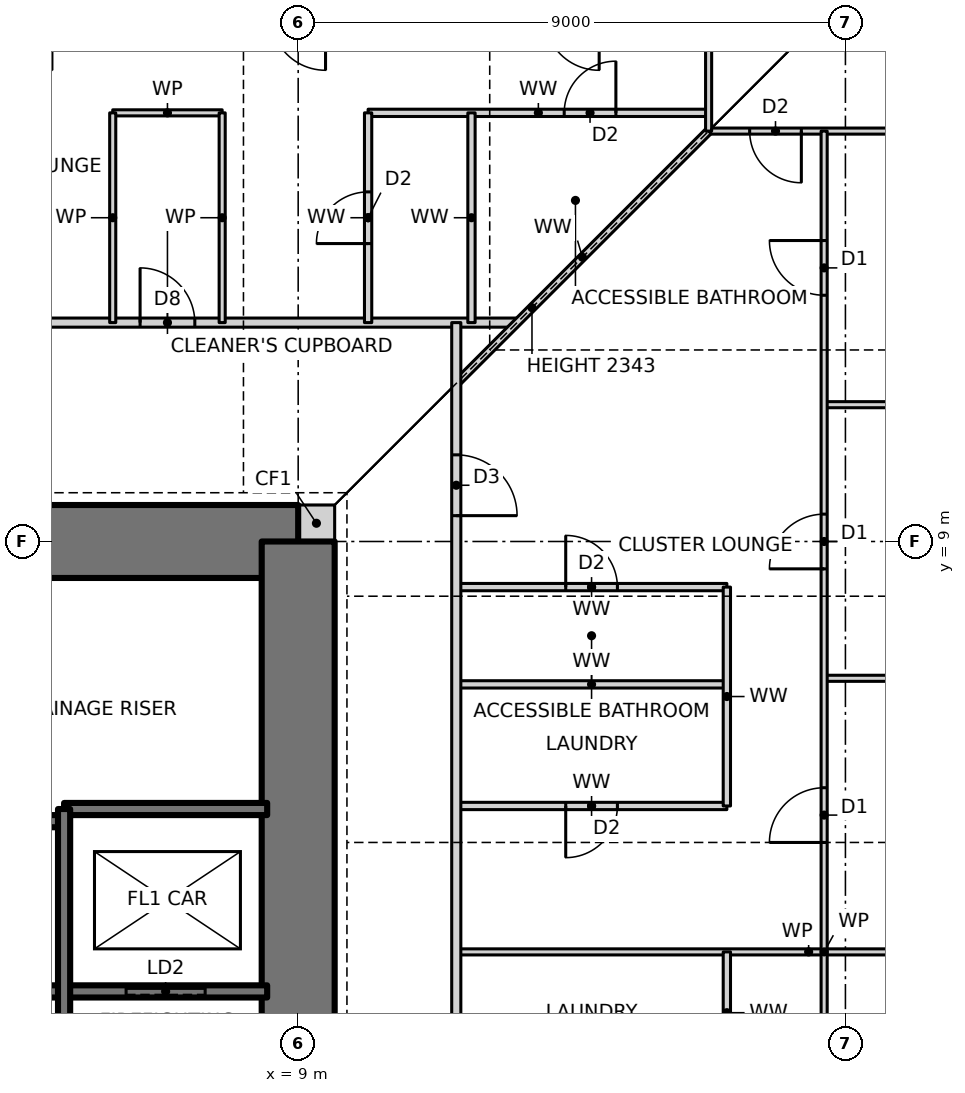
"""IFC4 building model, lengths in metres.
Left out: names, types, materials, properties, quantities, classifications, styles, units other than length and angle.
Written with IfcOpenShell. Run it as: python <this file> out.ifc"""

import sys

from ifc_helpers import new_model, si_unit, direction, frame, frame_2d, origin, place, context, subcontext, project, spatial, rectangle, extrude, element, fill, save


model = new_model("IFC4")
c1 = context("Model", 3, precision=1e-05, world=origin(), true_north=direction((0.0, 1.0)))
c2 = subcontext(c1, "Body", "Model", "MODEL_VIEW")
j1 = project(units=[si_unit("LENGTHUNIT", "METRE"), si_unit("PLANEANGLEUNIT", "RADIAN")], contexts=[c1])
p1 = place(None, origin())
s1 = spatial("IfcSite", under=j1, at=p1, CompositionType="ELEMENT")
p2 = place(p1, origin())
s2 = spatial("IfcBuilding", under=s1, at=p2, CompositionType="ELEMENT")
p3 = place(p2, frame((0.0, 0.0, 39.5)))
s3 = spatial("IfcBuildingStorey", under=s2, at=p3, CompositionType="ELEMENT", Elevation=39.5)
p4 = place(p3, frame((9.0, 9.3, 0.0), z_axis=(0.0, 0.0, 1.0), x_axis=(1.0, 0.0, 0.0)))
e1 = element("IfcWall", 1, at=p4, inside=s3, PredefinedType="SOLIDWALL", context=c2, shape_type="SweptSolid", body=[
    extrude(rectangle(XDim=0.6, YDim=0.6, at=frame_2d((0.3, 0.0))), origin(), (0.0, 0.0, 1.0), 3.5),
])
p5 = place(p3, frame((9.0, 9.0, 0.0), z_axis=(0.0, 0.0, 1.0), x_axis=(-1.0, 0.0, 0.0)))
e2 = element("IfcWall", 2, at=p5, inside=s3, PredefinedType="SHEAR", context=c2, shape_type="SweptSolid", body=[
    extrude(rectangle(XDim=18.0, YDim=1.2, at=frame_2d((9.0, 0.0))), origin(), (0.0, 0.0, 1.0), 3.5),
])
p6 = place(p5, frame((11.125, 0.0, 0.0)))
e3 = element("IfcOpeningElement", 3, at=p6, cuts=e2, PredefinedType="OPENING", context=c2, shape_type="SweptSolid", body=[
    extrude(rectangle(XDim=0.9, YDim=2.1, at=frame_2d((0.45, 1.05))), frame((0.0, 0.61, 0.0), z_axis=(0.0, -1.0, 0.0), x_axis=(1.0, 0.0, 0.0)), (0.0, 0.0, 1.0), 1.22),
])
p7 = place(p5, frame((4.275, 0.0, 0.0)))
e4 = element("IfcOpeningElement", 4, at=p7, cuts=e2, PredefinedType="OPENING", context=c2, shape_type="SweptSolid", body=[
    extrude(rectangle(XDim=0.9, YDim=2.1, at=frame_2d((0.45, 1.05))), frame((0.0, 0.61, 0.0), z_axis=(0.0, -1.0, 0.0), x_axis=(1.0, 0.0, 0.0)), (0.0, 0.0, 1.0), 1.22),
])
p8 = place(p3, frame((9.0, -9.0, 0.0), z_axis=(0.0, 0.0, 1.0), x_axis=(0.0, 1.0, 0.0)))
e5 = element("IfcWall", 5, at=p8, inside=s3, PredefinedType="SHEAR", context=c2, shape_type="SweptSolid", body=[
    extrude(rectangle(XDim=18.0, YDim=1.2, at=frame_2d((9.0, 0.0))), origin(), (0.0, 0.0, 1.0), 3.5),
])
p9 = place(p8, frame((8.5, 0.0, 0.0)))
e6 = element("IfcOpeningElement", 6, at=p9, cuts=e5, PredefinedType="OPENING", context=c2, shape_type="SweptSolid", body=[
    extrude(rectangle(XDim=1.0, YDim=2.1, at=frame_2d((0.5, 1.05))), frame((0.0, 0.61, 0.0), z_axis=(0.0, -1.0, 0.0), x_axis=(1.0, 0.0, 0.0)), (0.0, 0.0, 1.0), 1.22),
])
p10 = place(p3, frame((-8.49, 1.6, 0.0), z_axis=(0.0, 0.0, 1.0), x_axis=(1.0, 0.0, 0.0)))
e7 = element("IfcWall", 7, at=p10, inside=s3, PredefinedType="SOLIDWALL", context=c2, shape_type="SweptSolid", body=[
    extrude(rectangle(XDim=16.98, YDim=0.2, at=frame_2d((8.49, 0.0))), origin(), (0.0, 0.0, 1.0), 3.5),
])
p11 = place(p10, frame((1.17, 0.0, 0.0)))
e8 = element("IfcOpeningElement", 8, at=p11, cuts=e7, PredefinedType="OPENING", context=c2, shape_type="SweptSolid", body=[
    extrude(rectangle(XDim=1.0, YDim=2.1, at=frame_2d((0.5, 1.05))), frame((0.0, 0.11, 0.0), z_axis=(0.0, -1.0, 0.0), x_axis=(1.0, 0.0, 0.0)), (0.0, 0.0, 1.0), 0.22),
])
p12 = place(p10, frame((14.66, 0.0, 0.0)))
e9 = element("IfcOpeningElement", 9, at=p12, cuts=e7, PredefinedType="OPENING", context=c2, shape_type="SweptSolid", body=[
    extrude(rectangle(XDim=1.3, YDim=2.1, at=frame_2d((0.65, 1.05))), frame((0.0, 0.11, 0.0), z_axis=(0.0, -1.0, 0.0), x_axis=(1.0, 0.0, 0.0)), (0.0, 0.0, 1.0), 0.22),
])
p13 = place(p3, frame((11.6, 2.25, 0.0), z_axis=(0.0, 0.0, 1.0), x_axis=(1.0, 0.0, 0.0)))
e10 = element("IfcWall", 10, at=p13, inside=s3, PredefinedType="PARTITIONING", context=c2, shape_type="SweptSolid", body=[
    extrude(rectangle(XDim=11.59, YDim=0.1, at=frame_2d((5.795, 0.0))), origin(), (0.0, 0.0, 1.0), 3.27),
])
p14 = place(p3, frame((-5.15, 4.4, 0.0), z_axis=(0.0, 0.0, 1.0), x_axis=(1.0, 0.0, 0.0)))
e11 = element("IfcWall", 11, at=p14, inside=s3, PredefinedType="SOLIDWALL", context=c2, shape_type="SweptSolid", body=[
    extrude(rectangle(XDim=10.3, YDim=0.2, at=frame_2d((5.15, 0.0))), origin(), (0.0, 0.0, 1.0), 3.5),
])
p15 = place(p3, frame((5.15, 4.6, 0.0), z_axis=(0.0, 0.0, 1.0), x_axis=(1.0, 0.0, 0.0)))
e12 = element("IfcWall", 12, at=p15, inside=s3, PredefinedType="SOLIDWALL", context=c2, shape_type="SweptSolid", body=[
    extrude(rectangle(XDim=3.34, YDim=0.2, at=frame_2d((1.67, 0.0))), origin(), (0.0, 0.0, 1.0), 3.5),
])
p16 = place(p3, frame((11.6, 4.65, 0.0), z_axis=(0.0, 0.0, 1.0), x_axis=(1.0, 0.0, 0.0)))
e13 = element("IfcWall", 13, at=p16, inside=s3, PredefinedType="PARTITIONING", context=c2, shape_type="SweptSolid", body=[
    extrude(rectangle(XDim=4.45, YDim=0.12, at=frame_2d((2.225, 0.0))), origin(), (0.0, 0.0, 1.0), 3.27),
])
p17 = place(p16, frame((1.8, 0.0, 0.0)))
e14 = element("IfcOpeningElement", 14, at=p17, cuts=e13, PredefinedType="OPENING", context=c2, shape_type="SweptSolid", body=[
    extrude(rectangle(XDim=0.85, YDim=2.1, at=frame_2d((0.425, 1.05))), frame((0.0, 0.07, 0.0), z_axis=(0.0, -1.0, 0.0), x_axis=(1.0, 0.0, 0.0)), (0.0, 0.0, 1.0), 0.14),
])
p18 = place(p3, frame((11.6, 6.65, 0.0), z_axis=(0.0, 0.0, 1.0), x_axis=(1.0, 0.0, 0.0)))
e15 = element("IfcWall", 15, at=p18, inside=s3, PredefinedType="PARTITIONING", context=c2, shape_type="SweptSolid", body=[
    extrude(rectangle(XDim=4.45, YDim=0.12, at=frame_2d((2.225, 0.0))), origin(), (0.0, 0.0, 1.0), 3.27),
])
p19 = place(p3, frame((17.65, 6.75, 0.0), z_axis=(0.0, 0.0, 1.0), x_axis=(1.0, 0.0, 0.0)))
e16 = element("IfcWall", 16, at=p19, inside=s3, PredefinedType="PARTITIONING", context=c2, shape_type="SweptSolid", body=[
    extrude(rectangle(XDim=5.54, YDim=0.1, at=frame_2d((2.77, 0.0))), origin(), (0.0, 0.0, 1.0), 3.27),
])
p20 = place(p3, frame((11.6, 8.25, 0.0), z_axis=(0.0, 0.0, 1.0), x_axis=(1.0, 0.0, 0.0)))
e17 = element("IfcWall", 17, at=p20, inside=s3, PredefinedType="PARTITIONING", context=c2, shape_type="SweptSolid", body=[
    extrude(rectangle(XDim=4.45, YDim=0.12, at=frame_2d((2.225, 0.0))), origin(), (0.0, 0.0, 1.0), 3.27),
])
p21 = place(p20, frame((1.8, 0.0, 0.0)))
e18 = element("IfcOpeningElement", 18, at=p21, cuts=e17, PredefinedType="OPENING", context=c2, shape_type="SweptSolid", body=[
    extrude(rectangle(XDim=0.85, YDim=2.1, at=frame_2d((0.425, 1.05))), frame((0.0, 0.07, 0.0), z_axis=(0.0, -1.0, 0.0), x_axis=(1.0, 0.0, 0.0)), (0.0, 0.0, 1.0), 0.14),
])
p22 = place(p3, frame((17.65, 11.25, 0.0), z_axis=(0.0, 0.0, 1.0), x_axis=(1.0, 0.0, 0.0)))
e19 = element("IfcWall", 19, at=p22, inside=s3, PredefinedType="PARTITIONING", context=c2, shape_type="SweptSolid", body=[
    extrude(rectangle(XDim=5.54, YDim=0.1, at=frame_2d((2.77, 0.0))), origin(), (0.0, 0.0, 1.0), 3.27),
])
p23 = place(p3, frame((-12.6, 12.6, 0.0), z_axis=(0.0, 0.0, 1.0), x_axis=(1.0, 0.0, 0.0)))
e20 = element("IfcWall", 20, at=p23, inside=s3, PredefinedType="PARTITIONING", context=c2, shape_type="SweptSolid", body=[
    extrude(rectangle(XDim=25.2, YDim=0.15, at=frame_2d((12.6, 0.0))), origin(), (0.0, 0.0, 1.0), 3.27),
])
p24 = place(p23, frame((16.15, 0.0, 0.0)))
e21 = element("IfcOpeningElement", 21, at=p24, cuts=e20, PredefinedType="OPENING", context=c2, shape_type="SweptSolid", body=[
    extrude(rectangle(XDim=1.0, YDim=2.1, at=frame_2d((0.5, 1.05))), frame((0.0, 0.085, 0.0), z_axis=(0.0, -1.0, 0.0), x_axis=(1.0, 0.0, 0.0)), (0.0, 0.0, 1.0), 0.17),
])
p25 = place(p23, frame((19.0, 0.0, 0.0)))
e22 = element("IfcOpeningElement", 22, at=p25, cuts=e20, PredefinedType="OPENING", context=c2, shape_type="SweptSolid", body=[
    extrude(rectangle(XDim=0.9, YDim=2.1, at=frame_2d((0.45, 1.05))), frame((0.0, 0.085, 0.0), z_axis=(0.0, -1.0, 0.0), x_axis=(1.0, 0.0, 0.0)), (0.0, 0.0, 1.0), 0.17),
])
p26 = place(p3, frame((15.75, 15.75, 0.0), z_axis=(0.0, 0.0, 1.0), x_axis=(1.0, 0.0, 0.0)))
e23 = element("IfcWall", 23, at=p26, inside=s3, PredefinedType="PARTITIONING", context=c2, shape_type="SweptSolid", body=[
    extrude(rectangle(XDim=7.44, YDim=0.1, at=frame_2d((3.72, 0.0))), origin(), (0.0, 0.0, 1.0), 3.27),
])
p27 = place(p26, frame((0.675, 0.0, 0.0)))
e24 = element("IfcOpeningElement", 24, at=p27, cuts=e23, PredefinedType="OPENING", context=c2, shape_type="SweptSolid", body=[
    extrude(rectangle(XDim=0.85, YDim=2.1, at=frame_2d((0.425, 1.05))), frame((0.0, 0.06, 0.0), z_axis=(0.0, -1.0, 0.0), x_axis=(1.0, 0.0, 0.0)), (0.0, 0.0, 1.0), 0.12),
])
p28 = place(p3, frame((5.95, 16.05, 0.0), z_axis=(0.0, 0.0, 1.0), x_axis=(1.0, 0.0, 0.0)))
e25 = element("IfcWall", 25, at=p28, inside=s3, PredefinedType="PARTITIONING", context=c2, shape_type="SweptSolid", body=[
    extrude(rectangle(XDim=1.8, YDim=0.1, at=frame_2d((0.9, 0.0))), origin(), (0.0, 0.0, 1.0), 3.27),
])
p29 = place(p3, frame((10.15, 16.05, 0.0), z_axis=(0.0, 0.0, 1.0), x_axis=(1.0, 0.0, 0.0)))
e26 = element("IfcWall", 26, at=p29, inside=s3, PredefinedType="PARTITIONING", context=c2, shape_type="SweptSolid", body=[
    extrude(rectangle(XDim=5.6, YDim=0.12, at=frame_2d((2.8, 0.0))), origin(), (0.0, 0.0, 1.0), 3.27),
])
p30 = place(p29, frame((3.225, 0.0, 0.0)))
e27 = element("IfcOpeningElement", 27, at=p30, cuts=e26, PredefinedType="OPENING", context=c2, shape_type="SweptSolid", body=[
    extrude(rectangle(XDim=0.85, YDim=2.1, at=frame_2d((0.425, 1.05))), frame((0.0, 0.07, 0.0), z_axis=(0.0, -1.0, 0.0), x_axis=(1.0, 0.0, 0.0)), (0.0, 0.0, 1.0), 0.14),
])
p31 = place(p3, frame((11.6, 11.6, 0.0), z_axis=(0.0, 0.0, 1.0), x_axis=(0.707106781187, 0.707106781187, 0.0)))
e28 = element("IfcWall", 28, at=p31, inside=s3, PredefinedType="PARTITIONING", context=c2, shape_type="SweptSolid", body=[
    extrude(rectangle(XDim=5.869, YDim=0.12, at=frame_2d((2.935, 0.0))), origin(), (0.0, 0.0, 1.0), 2.343),
])
p32 = place(p3, frame((17.65, -11.25, 0.0), z_axis=(0.0, 0.0, 1.0), x_axis=(0.0, 1.0, 0.0)))
e29 = element("IfcWall", 29, at=p32, inside=s3, PredefinedType="PARTITIONING", context=c2, shape_type="SweptSolid", body=[
    extrude(rectangle(XDim=27.0, YDim=0.1, at=frame_2d((13.5, 0.0))), origin(), (0.0, 0.0, 1.0), 3.0),
])
p33 = place(p32, frame((1.8, 0.0, 0.0)))
e30 = element("IfcOpeningElement", 30, at=p33, cuts=e29, PredefinedType="OPENING", context=c2, shape_type="SweptSolid", body=[
    extrude(rectangle(XDim=0.9, YDim=2.1, at=frame_2d((0.45, 1.05))), frame((0.0, 0.06, 0.0), z_axis=(0.0, -1.0, 0.0), x_axis=(1.0, 0.0, 0.0)), (0.0, 0.0, 1.0), 0.12),
])
p34 = place(p32, frame((6.3, 0.0, 0.0)))
e31 = element("IfcOpeningElement", 31, at=p34, cuts=e29, PredefinedType="OPENING", context=c2, shape_type="SweptSolid", body=[
    extrude(rectangle(XDim=0.9, YDim=2.1, at=frame_2d((0.45, 1.05))), frame((0.0, 0.06, 0.0), z_axis=(0.0, -1.0, 0.0), x_axis=(1.0, 0.0, 0.0)), (0.0, 0.0, 1.0), 0.12),
])
p35 = place(p32, frame((10.8, 0.0, 0.0)))
e32 = element("IfcOpeningElement", 32, at=p35, cuts=e29, PredefinedType="OPENING", context=c2, shape_type="SweptSolid", body=[
    extrude(rectangle(XDim=0.9, YDim=2.1, at=frame_2d((0.45, 1.05))), frame((0.0, 0.06, 0.0), z_axis=(0.0, -1.0, 0.0), x_axis=(1.0, 0.0, 0.0)), (0.0, 0.0, 1.0), 0.12),
])
p36 = place(p32, frame((15.3, 0.0, 0.0)))
e33 = element("IfcOpeningElement", 33, at=p36, cuts=e29, PredefinedType="OPENING", context=c2, shape_type="SweptSolid", body=[
    extrude(rectangle(XDim=0.9, YDim=2.1, at=frame_2d((0.45, 1.05))), frame((0.0, 0.06, 0.0), z_axis=(0.0, -1.0, 0.0), x_axis=(1.0, 0.0, 0.0)), (0.0, 0.0, 1.0), 0.12),
])
p37 = place(p32, frame((19.8, 0.0, 0.0)))
e34 = element("IfcOpeningElement", 34, at=p37, cuts=e29, PredefinedType="OPENING", context=c2, shape_type="SweptSolid", body=[
    extrude(rectangle(XDim=0.9, YDim=2.1, at=frame_2d((0.45, 1.05))), frame((0.0, 0.06, 0.0), z_axis=(0.0, -1.0, 0.0), x_axis=(1.0, 0.0, 0.0)), (0.0, 0.0, 1.0), 0.12),
])
p38 = place(p32, frame((24.3, 0.0, 0.0)))
e35 = element("IfcOpeningElement", 35, at=p38, cuts=e29, PredefinedType="OPENING", context=c2, shape_type="SweptSolid", body=[
    extrude(rectangle(XDim=0.9, YDim=2.1, at=frame_2d((0.45, 1.05))), frame((0.0, 0.06, 0.0), z_axis=(0.0, -1.0, 0.0), x_axis=(1.0, 0.0, 0.0)), (0.0, 0.0, 1.0), 0.12),
])
p39 = place(p3, frame((16.05, 0.25, 0.0), z_axis=(0.0, 0.0, 1.0), x_axis=(0.0, 1.0, 0.0)))
e36 = element("IfcWall", 36, at=p39, inside=s3, PredefinedType="PARTITIONING", context=c2, shape_type="SweptSolid", body=[
    extrude(rectangle(XDim=2.0, YDim=0.12, at=frame_2d((1.0, 0.0))), origin(), (0.0, 0.0, 1.0), 3.27),
])
p40 = place(p3, frame((16.05, 4.65, 0.0), z_axis=(0.0, 0.0, 1.0), x_axis=(0.0, 1.0, 0.0)))
e37 = element("IfcWall", 37, at=p40, inside=s3, PredefinedType="PARTITIONING", context=c2, shape_type="SweptSolid", body=[
    extrude(rectangle(XDim=3.6, YDim=0.12, at=frame_2d((1.8, 0.0))), origin(), (0.0, 0.0, 1.0), 3.27),
])
p41 = place(p3, frame((15.75, 15.75, 0.0), z_axis=(0.0, 0.0, 1.0), x_axis=(0.0, 1.0, 0.0)))
e38 = element("IfcWall", 38, at=p41, inside=s3, PredefinedType="PARTITIONING", context=c2, shape_type="SweptSolid", body=[
    extrude(rectangle(XDim=7.44, YDim=0.1, at=frame_2d((3.72, 0.0))), origin(), (0.0, 0.0, 1.0), 3.27),
])
p42 = place(p3, frame((11.85, 12.6, 0.0), z_axis=(0.0, 0.0, 1.0), x_axis=(0.0, 1.0, 0.0)))
e39 = element("IfcWall", 39, at=p42, inside=s3, PredefinedType="PARTITIONING", context=c2, shape_type="SweptSolid", body=[
    extrude(rectangle(XDim=3.45, YDim=0.12, at=frame_2d((1.725, 0.0))), origin(), (0.0, 0.0, 1.0), 3.27),
])
p43 = place(p3, frame((11.6, -11.6, 0.0), z_axis=(0.0, 0.0, 1.0), x_axis=(0.0, 1.0, 0.0)))
e40 = element("IfcWall", 40, at=p43, inside=s3, PredefinedType="PARTITIONING", context=c2, shape_type="SweptSolid", body=[
    extrude(rectangle(XDim=24.2, YDim=0.15, at=frame_2d((12.1, 0.0))), origin(), (0.0, 0.0, 1.0), 3.27),
])
p44 = place(p43, frame((3.6, 0.0, 0.0)))
e41 = element("IfcOpeningElement", 41, at=p44, cuts=e40, PredefinedType="OPENING", context=c2, shape_type="SweptSolid", body=[
    extrude(rectangle(XDim=1.0, YDim=2.1, at=frame_2d((0.5, 1.05))), frame((0.0, 0.085, 0.0), z_axis=(0.0, -1.0, 0.0), x_axis=(1.0, 0.0, 0.0)), (0.0, 0.0, 1.0), 0.17),
])
p45 = place(p43, frame((21.025, 0.0, 0.0)))
e42 = element("IfcOpeningElement", 42, at=p45, cuts=e40, PredefinedType="OPENING", context=c2, shape_type="SweptSolid", body=[
    extrude(rectangle(XDim=1.0, YDim=2.1, at=frame_2d((0.5, 1.05))), frame((0.0, 0.085, 0.0), z_axis=(0.0, -1.0, 0.0), x_axis=(1.0, 0.0, 0.0)), (0.0, 0.0, 1.0), 0.17),
])
p46 = place(p3, frame((10.15, 12.6, 0.0), z_axis=(0.0, 0.0, 1.0), x_axis=(0.0, 1.0, 0.0)))
e43 = element("IfcWall", 43, at=p46, inside=s3, PredefinedType="PARTITIONING", context=c2, shape_type="SweptSolid", body=[
    extrude(rectangle(XDim=3.45, YDim=0.12, at=frame_2d((1.725, 0.0))), origin(), (0.0, 0.0, 1.0), 3.27),
])
p47 = place(p46, frame((1.3, 0.0, 0.0)))
e44 = element("IfcOpeningElement", 44, at=p47, cuts=e43, PredefinedType="OPENING", context=c2, shape_type="SweptSolid", body=[
    extrude(rectangle(XDim=0.85, YDim=2.1, at=frame_2d((0.425, 1.05))), frame((0.0, 0.07, 0.0), z_axis=(0.0, -1.0, 0.0), x_axis=(1.0, 0.0, 0.0)), (0.0, 0.0, 1.0), 0.14),
])
for number, where, z_axis, x_axis in (
    (45, (7.75, 12.6, 0.0), (0.0, 0.0, 1.0), (0.0, 1.0, 0.0)),
    (46, (5.95, 12.6, 0.0), (0.0, 0.0, 1.0), (0.0, 1.0, 0.0)),
):
    element("IfcWall", number, at=place(p3, frame(where, z_axis=z_axis, x_axis=x_axis)), inside=s3, PredefinedType="PARTITIONING", context=c2, shape_type="SweptSolid", body=[
        extrude(rectangle(XDim=3.45, YDim=0.1, at=frame_2d((1.725, 0.0))), origin(), (0.0, 0.0, 1.0), 3.27),
    ])
p48 = place(p3, frame((5.15, -8.49, 0.0), z_axis=(0.0, 0.0, 1.0), x_axis=(0.0, 1.0, 0.0)))
e47 = element("IfcWall", 47, at=p48, inside=s3, PredefinedType="SOLIDWALL", context=c2, shape_type="SweptSolid", body=[
    extrude(rectangle(XDim=13.09, YDim=0.2, at=frame_2d((6.545, 0.0))), origin(), (0.0, 0.0, 1.0), 3.5),
])
p49 = place(p48, frame((7.89, 0.0, 0.0)))
e48 = element("IfcOpeningElement", 48, at=p49, cuts=e47, PredefinedType="OPENING", context=c2, shape_type="SweptSolid", body=[
    extrude(rectangle(XDim=1.2, YDim=2.1, at=frame_2d((0.6, 1.05))), frame((0.0, 0.11, 0.0), z_axis=(0.0, -1.0, 0.0), x_axis=(1.0, 0.0, 0.0)), (0.0, 0.0, 1.0), 0.22),
])
p50 = place(p36, origin())
e49 = element("IfcDoor", 49, at=p50, inside=s3, OperationType="SINGLE_SWING_LEFT", PredefinedType="DOOR", context=c2, shape_type="SweptSolid", body=[
    extrude(rectangle(XDim=0.9, YDim=2.1, at=frame_2d((0.45, 1.05))), frame((0.0, 0.025, 0.0), z_axis=(0.0, -1.0, 0.0), x_axis=(1.0, 0.0, 0.0)), (0.0, 0.0, 1.0), 0.05),
])
fill(e33, e49)
p51 = place(p37, origin())
e50 = element("IfcDoor", 50, at=p51, inside=s3, OperationType="SINGLE_SWING_LEFT", PredefinedType="DOOR", context=c2, shape_type="SweptSolid", body=[
    extrude(rectangle(XDim=0.9, YDim=2.1, at=frame_2d((0.45, 1.05))), frame((0.0, 0.025, 0.0), z_axis=(0.0, -1.0, 0.0), x_axis=(1.0, 0.0, 0.0)), (0.0, 0.0, 1.0), 0.05),
])
fill(e34, e50)
p52 = place(p38, origin())
e51 = element("IfcDoor", 51, at=p52, inside=s3, OperationType="SINGLE_SWING_RIGHT", PredefinedType="DOOR", context=c2, shape_type="SweptSolid", body=[
    extrude(rectangle(XDim=0.9, YDim=2.1, at=frame_2d((0.45, 1.05))), frame((0.0, 0.025, 0.0), z_axis=(0.0, -1.0, 0.0), x_axis=(1.0, 0.0, 0.0)), (0.0, 0.0, 1.0), 0.05),
])
fill(e35, e51)
p53 = place(p45, frame((1.0, 0.0, 0.0), z_axis=(0.0, 0.0, 1.0), x_axis=(-1.0, 0.0, 0.0)))
e52 = element("IfcDoor", 52, at=p53, inside=s3, OperationType="SINGLE_SWING_RIGHT", PredefinedType="DOOR", context=c2, shape_type="SweptSolid", body=[
    extrude(rectangle(XDim=1.0, YDim=2.1, at=frame_2d((0.5, 1.05))), frame((0.0, 0.025, 0.0), z_axis=(0.0, -1.0, 0.0), x_axis=(1.0, 0.0, 0.0)), (0.0, 0.0, 1.0), 0.05),
])
fill(e42, e52)
p54 = place(p17, frame((0.85, 0.0, 0.0), z_axis=(0.0, 0.0, 1.0), x_axis=(-1.0, 0.0, 0.0)))
e53 = element("IfcDoor", 53, at=p54, inside=s3, OperationType="SINGLE_SWING_RIGHT", PredefinedType="DOOR", context=c2, shape_type="SweptSolid", body=[
    extrude(rectangle(XDim=0.85, YDim=2.1, at=frame_2d((0.425, 1.05))), frame((0.0, 0.025, 0.0), z_axis=(0.0, -1.0, 0.0), x_axis=(1.0, 0.0, 0.0)), (0.0, 0.0, 1.0), 0.05),
])
fill(e14, e53)
p55 = place(p21, origin())
e54 = element("IfcDoor", 54, at=p55, inside=s3, OperationType="SINGLE_SWING_LEFT", PredefinedType="DOOR", context=c2, shape_type="SweptSolid", body=[
    extrude(rectangle(XDim=0.85, YDim=2.1, at=frame_2d((0.425, 1.05))), frame((0.0, 0.025, 0.0), z_axis=(0.0, -1.0, 0.0), x_axis=(1.0, 0.0, 0.0)), (0.0, 0.0, 1.0), 0.05),
])
fill(e18, e54)
p56 = place(p30, origin())
e55 = element("IfcDoor", 55, at=p56, inside=s3, OperationType="SINGLE_SWING_RIGHT", PredefinedType="DOOR", context=c2, shape_type="SweptSolid", body=[
    extrude(rectangle(XDim=0.85, YDim=2.1, at=frame_2d((0.425, 1.05))), frame((0.0, 0.025, 0.0), z_axis=(0.0, -1.0, 0.0), x_axis=(1.0, 0.0, 0.0)), (0.0, 0.0, 1.0), 0.05),
])
fill(e27, e55)
p57 = place(p47, origin())
e56 = element("IfcDoor", 56, at=p57, inside=s3, OperationType="SINGLE_SWING_LEFT", PredefinedType="DOOR", context=c2, shape_type="SweptSolid", body=[
    extrude(rectangle(XDim=0.85, YDim=2.1, at=frame_2d((0.425, 1.05))), frame((0.0, 0.025, 0.0), z_axis=(0.0, -1.0, 0.0), x_axis=(1.0, 0.0, 0.0)), (0.0, 0.0, 1.0), 0.05),
])
fill(e44, e56)
p58 = place(p25, origin())
e57 = element("IfcDoor", 57, at=p58, inside=s3, OperationType="SINGLE_SWING_LEFT", PredefinedType="DOOR", context=c2, shape_type="SweptSolid", body=[
    extrude(rectangle(XDim=0.9, YDim=2.1, at=frame_2d((0.45, 1.05))), frame((0.0, 0.025, 0.0), z_axis=(0.0, -1.0, 0.0), x_axis=(1.0, 0.0, 0.0)), (0.0, 0.0, 1.0), 0.05),
])
fill(e22, e57)
p59 = place(p27, frame((0.85, 0.0, 0.0), z_axis=(0.0, 0.0, 1.0), x_axis=(-1.0, 0.0, 0.0)))
e58 = element("IfcDoor", 58, at=p59, inside=s3, OperationType="SINGLE_SWING_LEFT", PredefinedType="DOOR", context=c2, shape_type="SweptSolid", body=[
    extrude(rectangle(XDim=0.85, YDim=2.1, at=frame_2d((0.425, 1.05))), frame((0.0, 0.025, 0.0), z_axis=(0.0, -1.0, 0.0), x_axis=(1.0, 0.0, 0.0)), (0.0, 0.0, 1.0), 0.05),
])
fill(e24, e58)
p60 = place(p12, origin())
e59 = element("IfcDoor", 59, at=p60, inside=s3, OperationType="SLIDING_TO_LEFT", PredefinedType="DOOR", context=c2, shape_type="SweptSolid", body=[
    extrude(rectangle(XDim=1.3, YDim=2.1, at=frame_2d((0.65, 1.05))), frame((0.0, 0.025, 0.0), z_axis=(0.0, -1.0, 0.0), x_axis=(1.0, 0.0, 0.0)), (0.0, 0.0, 1.0), 0.05),
])
fill(e9, e59)
save(model, sys.argv[1])
